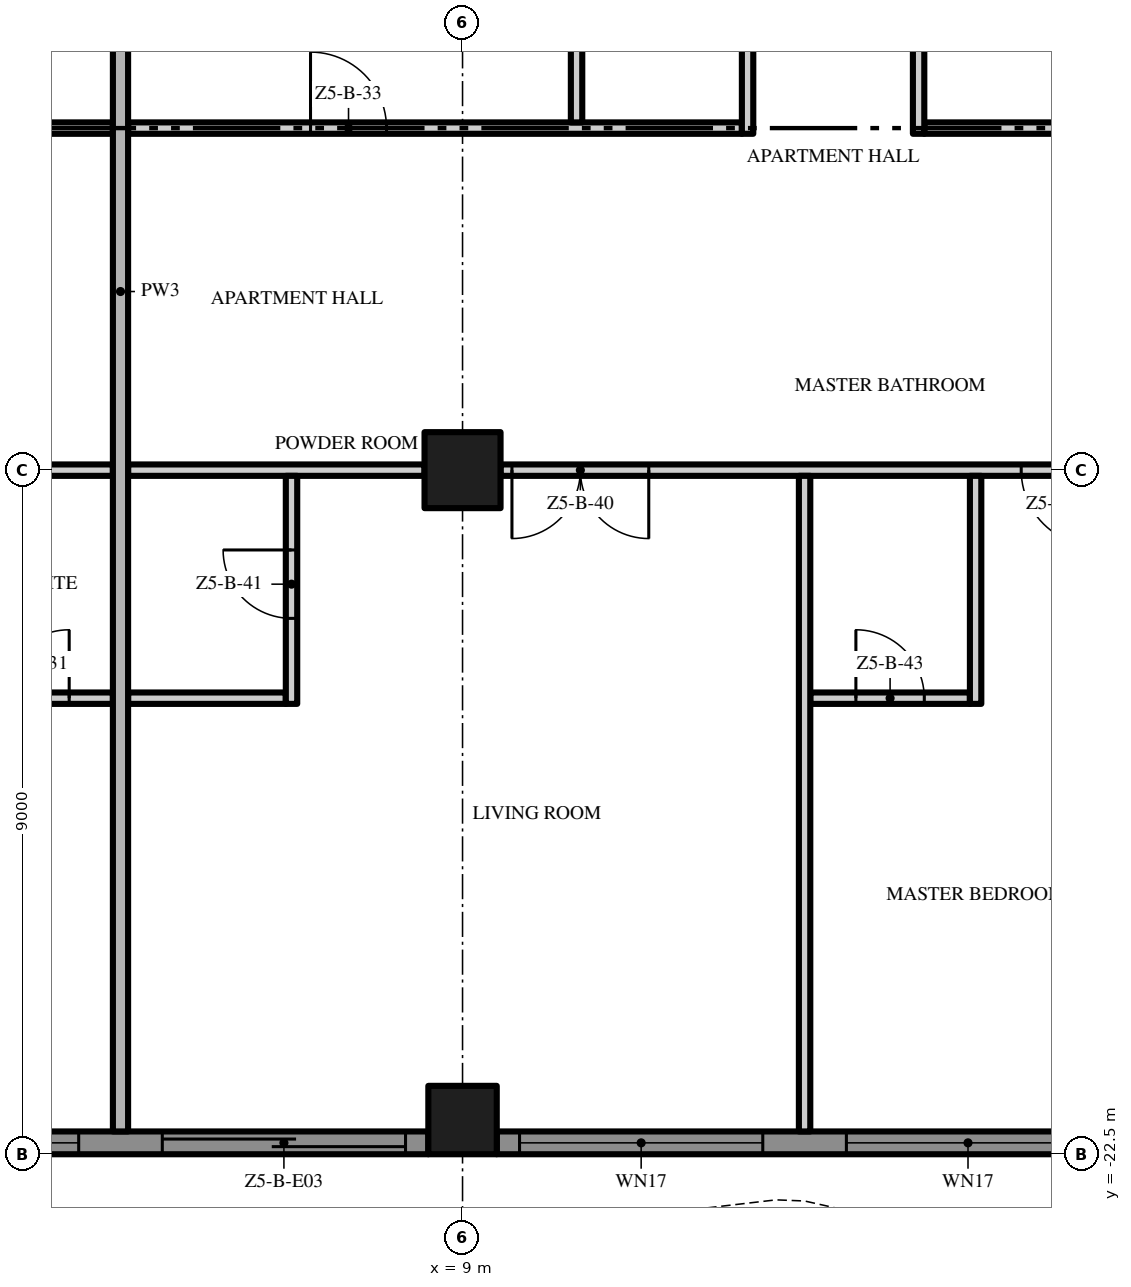
"""IFC4 building model, lengths in metres.
Left out: names, types, materials, properties, quantities, classifications, styles, units other than length and angle.
Written with IfcOpenShell. Run it as: python <this file> out.ifc"""

import sys

from ifc_helpers import new_model, si_unit, direction, frame, frame_2d, origin, origin_2d, place, context, subcontext, project, spatial, polyline, rectangle, outline, extrude, element, fill, save


model = new_model("IFC4")
c1 = context("Model", 3, precision=1e-05, world=origin(), true_north=direction((0.0, 1.0)))
c2 = subcontext(c1, "Body", "Model", "MODEL_VIEW")
j1 = project(units=[si_unit("LENGTHUNIT", "METRE"), si_unit("PLANEANGLEUNIT", "RADIAN")], contexts=[c1])
p1 = place(None, origin())
s1 = spatial("IfcSite", under=j1, at=p1, CompositionType="ELEMENT")
p2 = place(p1, origin())
s2 = spatial("IfcBuilding", under=s1, at=p2, CompositionType="ELEMENT")
p3 = place(p2, frame((0.0, 0.0, 254.0)))
s3 = spatial("IfcBuildingStorey", under=s2, at=p3, CompositionType="ELEMENT", Elevation=254.0)
p4 = place(p3, frame((9.0, -13.5, 0.0), z_axis=(0.0, 0.0, 1.0), x_axis=(1.0, 0.0, 0.0)))
e1 = element("IfcColumn", 1, at=p4, inside=s3, PredefinedType="COLUMN", context=c2, shape_type="SweptSolid", body=[
    extrude(rectangle(XDim=1.0, YDim=1.0, at=origin_2d()), origin(), (0.0, 0.0, 1.0), 3.5),
])
p5 = place(p3, frame((9.0, -22.05, 0.0), z_axis=(0.0, 0.0, 1.0), x_axis=(1.0, 0.0, 0.0)))
e2 = element("IfcColumn", 2, at=p5, inside=s3, PredefinedType="COLUMN", context=c2, shape_type="SweptSolid", body=[
    extrude(rectangle(XDim=0.9, YDim=0.9, at=origin_2d()), origin(), (0.0, 0.0, 1.0), 3.5),
])
p6 = place(p3, frame((8.55, -22.35, 0.0), z_axis=(0.0, 0.0, 1.0), x_axis=(-1.0, 0.0, 0.0)))
e3 = element("IfcWall", 3, at=p6, inside=s3, PredefinedType="SOLIDWALL", context=c2, shape_type="SweptSolid", body=[
    extrude(rectangle(XDim=8.1, YDim=0.3, at=frame_2d((4.05, 0.0))), origin(), (0.0, 0.0, 1.0), 3.5),
])
p7 = place(p6, frame((4.6, 0.0, 0.45)))
e4 = element("IfcOpeningElement", 4, at=p7, cuts=e3, PredefinedType="OPENING", context=c2, shape_type="SweptSolid", body=[
    extrude(rectangle(XDim=3.2, YDim=2.65, at=frame_2d((1.6, 1.325))), frame((0.0, 0.16, 0.0), z_axis=(0.0, -1.0, 0.0), x_axis=(1.0, 0.0, 0.0)), (0.0, 0.0, 1.0), 0.32),
])
p8 = place(p6, frame((0.3, 0.0, 0.0)))
e5 = element("IfcOpeningElement", 5, at=p8, cuts=e3, PredefinedType="OPENING", context=c2, shape_type="SweptSolid", body=[
    extrude(rectangle(XDim=3.2, YDim=2.4, at=frame_2d((1.6, 1.2))), frame((0.0, 0.16, 0.0), z_axis=(0.0, -1.0, 0.0), x_axis=(1.0, 0.0, 0.0)), (0.0, 0.0, 1.0), 0.32),
])
p9 = place(p3, frame((17.55, -22.35, 0.0), z_axis=(0.0, 0.0, 1.0), x_axis=(-1.0, 0.0, 0.0)))
e6 = element("IfcWall", 6, at=p9, inside=s3, PredefinedType="SOLIDWALL", context=c2, shape_type="SweptSolid", body=[
    extrude(rectangle(XDim=8.1, YDim=0.3, at=frame_2d((4.05, 0.0))), origin(), (0.0, 0.0, 1.0), 3.5),
])
p10 = place(p9, frame((4.6, 0.0, 0.45)))
e7 = element("IfcOpeningElement", 7, at=p10, cuts=e6, PredefinedType="OPENING", context=c2, shape_type="SweptSolid", body=[
    extrude(rectangle(XDim=3.2, YDim=2.65, at=frame_2d((1.6, 1.325))), frame((0.0, 0.16, 0.0), z_axis=(0.0, -1.0, 0.0), x_axis=(1.0, 0.0, 0.0)), (0.0, 0.0, 1.0), 0.32),
])
p11 = place(p9, frame((0.3, 0.0, 0.45)))
e8 = element("IfcOpeningElement", 8, at=p11, cuts=e6, PredefinedType="OPENING", context=c2, shape_type="SweptSolid", body=[
    extrude(rectangle(XDim=3.2, YDim=2.65, at=frame_2d((1.6, 1.325))), frame((0.0, 0.16, 0.0), z_axis=(0.0, -1.0, 0.0), x_axis=(1.0, 0.0, 0.0)), (0.0, 0.0, 1.0), 0.32),
])
p12 = place(p3, origin())
e9 = element("IfcWall", 9, at=p12, inside=s3, PredefinedType="USERDEFINED", context=c2, shape_type="SweptSolid", body=[
    extrude(outline(polyline([(-22.5, -25.149), (-21.0, -24.488), (-19.5, -23.755), (-18.0, -23.231), (-16.875, -23.1), (-16.5, -23.115), (-15.0, -23.451), (-13.5, -24.112), (-12.0, -24.845), (-10.5, -25.369), (-9.375, -25.5), (-9.0, -25.485), (-7.5, -25.149), (-6.0, -24.488), (-4.5, -23.755), (-3.0, -23.231), (-1.875, -23.1), (-1.5, -23.115), (0.0, -23.451), (1.5, -24.112), (3.0, -24.845), (4.5, -25.369), (5.625, -25.5), (6.0, -25.485), (7.5, -25.149), (9.0, -24.488), (10.5, -23.755), (12.0, -23.231), (13.125, -23.1), (13.5, -23.115), (15.0, -23.451), (16.5, -24.112), (18.0, -24.845), (19.5, -25.369), (20.625, -25.5), (21.0, -25.485), (22.5, -25.149), (22.445, -24.905), (20.967, -25.236), (20.635, -25.249), (19.556, -25.124), (18.096, -24.614), (16.605, -23.885), (15.079, -23.213), (13.533, -22.866), (13.115, -22.849), (11.944, -22.986), (10.404, -23.524), (8.895, -24.261), (7.421, -24.91), (5.967, -25.236), (5.635, -25.249), (4.556, -25.124), (3.096, -24.614), (1.605, -23.885), (0.079, -23.213), (-1.467, -22.866), (-1.885, -22.849), (-3.056, -22.986), (-4.596, -23.524), (-6.105, -24.261), (-7.579, -24.91), (-9.033, -25.236), (-9.365, -25.249), (-10.444, -25.124), (-11.904, -24.614), (-13.395, -23.885), (-14.921, -23.213), (-16.467, -22.866), (-16.885, -22.849), (-18.056, -22.986), (-19.596, -23.524), (-21.105, -24.261), (-22.601, -24.92), (-22.5, -25.149)])), origin(), (0.0, 0.0, 1.0), 0.9),
])
p13 = place(p3, frame((2.325, -16.5, 0.0), z_axis=(0.0, 0.0, 1.0), x_axis=(1.0, 0.0, 0.0)))
e10 = element("IfcWall", 10, at=p13, inside=s3, PredefinedType="PARTITIONING", context=c2, shape_type="SweptSolid", body=[
    extrude(rectangle(XDim=2.075, YDim=0.15, at=frame_2d((1.038, 0.0))), origin(), (0.0, 0.0, 1.0), 3.5),
])
p14 = place(p13, frame((0.6, 0.0, 0.0)))
e11 = element("IfcOpeningElement", 11, at=p14, cuts=e10, PredefinedType="OPENING", context=c2, shape_type="SweptSolid", body=[
    extrude(rectangle(XDim=0.9, YDim=2.1, at=frame_2d((0.45, 1.05))), frame((0.0, 0.085, 0.0), z_axis=(0.0, -1.0, 0.0), x_axis=(1.0, 0.0, 0.0)), (0.0, 0.0, 1.0), 0.17),
])
p15 = place(p3, frame((4.6, -16.5, 0.0), z_axis=(0.0, 0.0, 1.0), x_axis=(1.0, 0.0, 0.0)))
e12 = element("IfcWall", 12, at=p15, inside=s3, PredefinedType="PARTITIONING", context=c2, shape_type="SweptSolid", body=[
    extrude(rectangle(XDim=2.075, YDim=0.15, at=frame_2d((1.038, 0.0))), origin(), (0.0, 0.0, 1.0), 3.5),
])
p16 = place(p3, frame((13.575, -16.5, 0.0), z_axis=(0.0, 0.0, 1.0), x_axis=(1.0, 0.0, 0.0)))
e13 = element("IfcWall", 13, at=p16, inside=s3, PredefinedType="PARTITIONING", context=c2, shape_type="SweptSolid", body=[
    extrude(rectangle(XDim=2.1, YDim=0.15, at=frame_2d((1.05, 0.0))), origin(), (0.0, 0.0, 1.0), 3.5),
])
p17 = place(p16, frame((0.6, 0.0, 0.0)))
e14 = element("IfcOpeningElement", 14, at=p17, cuts=e13, PredefinedType="OPENING", context=c2, shape_type="SweptSolid", body=[
    extrude(rectangle(XDim=0.9, YDim=2.1, at=frame_2d((0.45, 1.05))), frame((0.0, 0.085, 0.0), z_axis=(0.0, -1.0, 0.0), x_axis=(1.0, 0.0, 0.0)), (0.0, 0.0, 1.0), 0.17),
])
p18 = place(p3, frame((4.4, -13.5, 0.0), z_axis=(0.0, 0.0, 1.0), x_axis=(-1.0, 0.0, 0.0)))
e15 = element("IfcWall", 15, at=p18, inside=s3, PredefinedType="PARTITIONING", context=c2, shape_type="SweptSolid", body=[
    extrude(rectangle(XDim=3.9, YDim=0.15, at=frame_2d((1.95, 0.0))), origin(), (0.0, 0.0, 1.0), 3.5),
])
p19 = place(p18, frame((2.75, 0.0, 0.0)))
e16 = element("IfcOpeningElement", 16, at=p19, cuts=e15, PredefinedType="OPENING", context=c2, shape_type="SweptSolid", body=[
    extrude(rectangle(XDim=1.0, YDim=2.4, at=frame_2d((0.5, 1.2))), frame((0.0, 0.085, 0.0), z_axis=(0.0, -1.0, 0.0), x_axis=(1.0, 0.0, 0.0)), (0.0, 0.0, 1.0), 0.17),
])
p20 = place(p3, frame((4.6, -13.5, 0.0), z_axis=(0.0, 0.0, 1.0), x_axis=(1.0, 0.0, 0.0)))
e17 = element("IfcWall", 17, at=p20, inside=s3, PredefinedType="PARTITIONING", context=c2, shape_type="SweptSolid", body=[
    extrude(rectangle(XDim=3.9, YDim=0.15, at=frame_2d((1.95, 0.0))), origin(), (0.0, 0.0, 1.0), 3.5),
])
p21 = place(p3, frame((17.5, -13.5, 0.0), z_axis=(0.0, 0.0, 1.0), x_axis=(-1.0, 0.0, 0.0)))
e18 = element("IfcWall", 18, at=p21, inside=s3, PredefinedType="PARTITIONING", context=c2, shape_type="SweptSolid", body=[
    extrude(rectangle(XDim=8.0, YDim=0.15, at=frame_2d((4.0, 0.0))), origin(), (0.0, 0.0, 1.0), 3.5),
])
p22 = place(p21, frame((6.05, 0.0, 0.0)))
e19 = element("IfcOpeningElement", 19, at=p22, cuts=e18, PredefinedType="OPENING", context=c2, shape_type="SweptSolid", body=[
    extrude(rectangle(XDim=1.8, YDim=2.4, at=frame_2d((0.9, 1.2))), frame((0.0, 0.085, 0.0), z_axis=(0.0, -1.0, 0.0), x_axis=(1.0, 0.0, 0.0)), (0.0, 0.0, 1.0), 0.17),
])
p23 = place(p21, frame((0.15, 0.0, 0.0)))
e20 = element("IfcOpeningElement", 20, at=p23, cuts=e18, PredefinedType="OPENING", context=c2, shape_type="SweptSolid", body=[
    extrude(rectangle(XDim=1.0, YDim=2.4, at=frame_2d((0.5, 1.2))), frame((0.0, 0.085, 0.0), z_axis=(0.0, -1.0, 0.0), x_axis=(1.0, 0.0, 0.0)), (0.0, 0.0, 1.0), 0.17),
])
p24 = place(p3, frame((-9.225, -9.0, 0.0), z_axis=(0.0, 0.0, 1.0), x_axis=(1.0, 0.0, 0.0)))
e21 = element("IfcWall", 21, at=p24, inside=s3, PredefinedType="PARTITIONING", context=c2, shape_type="SweptSolid", body=[
    extrude(rectangle(XDim=13.625, YDim=0.15, at=frame_2d((6.812, 0.0))), origin(), (0.0, 0.0, 1.0), 3.5),
])
p25 = place(p24, frame((1.0, 0.0, 0.0)))
e22 = element("IfcOpeningElement", 22, at=p25, cuts=e21, PredefinedType="OPENING", context=c2, shape_type="SweptSolid", body=[
    extrude(rectangle(XDim=0.9, YDim=2.1, at=frame_2d((0.45, 1.05))), frame((0.0, 0.085, 0.0), z_axis=(0.0, -1.0, 0.0), x_axis=(1.0, 0.0, 0.0)), (0.0, 0.0, 1.0), 0.17),
])
p26 = place(p24, frame((5.125, 0.0, 0.0)))
e23 = element("IfcOpeningElement", 23, at=p26, cuts=e21, PredefinedType="OPENING", context=c2, shape_type="SweptSolid", body=[
    extrude(rectangle(XDim=0.9, YDim=2.1, at=frame_2d((0.45, 1.05))), frame((0.0, 0.085, 0.0), z_axis=(0.0, -1.0, 0.0), x_axis=(1.0, 0.0, 0.0)), (0.0, 0.0, 1.0), 0.17),
])
p27 = place(p3, frame((4.6, -9.0, 0.0), z_axis=(0.0, 0.0, 1.0), x_axis=(1.0, 0.0, 0.0)))
e24 = element("IfcWall", 24, at=p27, inside=s3, PredefinedType="PARTITIONING", context=c2, shape_type="SweptSolid", body=[
    extrude(rectangle(XDim=8.075, YDim=0.15, at=frame_2d((4.037, 0.0))), origin(), (0.0, 0.0, 1.0), 3.5),
])
p28 = place(p27, frame((2.4, 0.0, 0.0)))
e25 = element("IfcOpeningElement", 25, at=p28, cuts=e24, PredefinedType="OPENING", context=c2, shape_type="SweptSolid", body=[
    extrude(rectangle(XDim=1.0, YDim=2.4, at=frame_2d((0.5, 1.2))), frame((0.0, 0.085, 0.0), z_axis=(0.0, -1.0, 0.0), x_axis=(1.0, 0.0, 0.0)), (0.0, 0.0, 1.0), 0.17),
])
p29 = place(p3, frame((15.075, -9.0, 0.0), z_axis=(0.0, 0.0, 1.0), x_axis=(1.0, 0.0, 0.0)))
e26 = element("IfcWall", 26, at=p29, inside=s3, PredefinedType="PARTITIONING", context=c2, shape_type="SweptSolid", body=[
    extrude(rectangle(XDim=11.625, YDim=0.15, at=frame_2d((5.812, 0.0))), origin(), (0.0, 0.0, 1.0), 3.5),
])
p30 = place(p29, frame((10.675, 0.0, 0.0)))
e27 = element("IfcOpeningElement", 27, at=p30, cuts=e26, PredefinedType="OPENING", context=c2, shape_type="SweptSolid", body=[
    extrude(rectangle(XDim=0.8, YDim=2.0, at=frame_2d((0.4, 1.0))), frame((0.0, 0.085, 0.0), z_axis=(0.0, -1.0, 0.0), x_axis=(1.0, 0.0, 0.0)), (0.0, 0.0, 1.0), 0.17),
])
p31 = place(p3, frame((4.5, -22.2, 0.0), z_axis=(0.0, 0.0, 1.0), x_axis=(0.0, 1.0, 0.0)))
e28 = element("IfcWall", 28, at=p31, inside=s3, PredefinedType="PARTITIONING", context=c2, shape_type="SweptSolid", body=[
    extrude(rectangle(XDim=22.1, YDim=0.2, at=frame_2d((11.05, 0.0))), origin(), (0.0, 0.0, 1.0), 3.5),
])
p32 = place(p3, frame((6.75, -16.575, 0.0), z_axis=(0.0, 0.0, 1.0), x_axis=(0.0, 1.0, 0.0)))
e29 = element("IfcWall", 29, at=p32, inside=s3, PredefinedType="PARTITIONING", context=c2, shape_type="SweptSolid", body=[
    extrude(rectangle(XDim=3.0, YDim=0.15, at=frame_2d((1.5, 0.0))), origin(), (0.0, 0.0, 1.0), 3.5),
])
p33 = place(p32, frame((1.125, 0.0, 0.0)))
e30 = element("IfcOpeningElement", 30, at=p33, cuts=e29, PredefinedType="OPENING", context=c2, shape_type="SweptSolid", body=[
    extrude(rectangle(XDim=0.9, YDim=2.1, at=frame_2d((0.45, 1.05))), frame((0.0, 0.085, 0.0), z_axis=(0.0, -1.0, 0.0), x_axis=(1.0, 0.0, 0.0)), (0.0, 0.0, 1.0), 0.17),
])
p34 = place(p3, frame((10.5, -8.925, 0.0), z_axis=(0.0, 0.0, 1.0), x_axis=(0.0, 1.0, 0.0)))
e31 = element("IfcWall", 31, at=p34, inside=s3, PredefinedType="PARTITIONING", context=c2, shape_type="SweptSolid", body=[
    extrude(rectangle(XDim=4.35, YDim=0.15, at=frame_2d((2.175, 0.0))), origin(), (0.0, 0.0, 1.0), 3.5),
])
p35 = place(p3, frame((12.75, -9.075, 0.0), z_axis=(0.0, 0.0, 1.0), x_axis=(0.0, 1.0, 0.0)))
e32 = element("IfcWall", 32, at=p35, inside=s3, PredefinedType="PARTITIONING", context=c2, shape_type="SweptSolid", body=[
    extrude(rectangle(XDim=4.5, YDim=0.15, at=frame_2d((2.25, 0.0))), origin(), (0.0, 0.0, 1.0), 3.5),
])
p36 = place(p35, frame((1.875, 0.0, 0.0)))
e33 = element("IfcOpeningElement", 33, at=p36, cuts=e32, PredefinedType="OPENING", context=c2, shape_type="SweptSolid", body=[
    extrude(rectangle(XDim=0.9, YDim=2.1, at=frame_2d((0.45, 1.05))), frame((0.0, 0.085, 0.0), z_axis=(0.0, -1.0, 0.0), x_axis=(1.0, 0.0, 0.0)), (0.0, 0.0, 1.0), 0.17),
])
p37 = place(p3, frame((13.5, -22.2, 0.0), z_axis=(0.0, 0.0, 1.0), x_axis=(0.0, 1.0, 0.0)))
e34 = element("IfcWall", 34, at=p37, inside=s3, PredefinedType="PARTITIONING", context=c2, shape_type="SweptSolid", body=[
    extrude(rectangle(XDim=8.625, YDim=0.15, at=frame_2d((4.312, 0.0))), origin(), (0.0, 0.0, 1.0), 3.5),
])
p38 = place(p3, frame((15.0, -9.075, 0.0), z_axis=(0.0, 0.0, 1.0), x_axis=(0.0, 1.0, 0.0)))
e35 = element("IfcWall", 35, at=p38, inside=s3, PredefinedType="PARTITIONING", context=c2, shape_type="SweptSolid", body=[
    extrude(rectangle(XDim=4.65, YDim=0.15, at=frame_2d((2.325, 0.0))), origin(), (0.0, 0.0, 1.0), 3.5),
])
p39 = place(p3, frame((15.75, -16.575, 0.0), z_axis=(0.0, 0.0, 1.0), x_axis=(0.0, 1.0, 0.0)))
e36 = element("IfcWall", 36, at=p39, inside=s3, PredefinedType="PARTITIONING", context=c2, shape_type="SweptSolid", body=[
    extrude(rectangle(XDim=3.0, YDim=0.15, at=frame_2d((1.5, 0.0))), origin(), (0.0, 0.0, 1.0), 3.5),
])
p40 = place(p7, origin())
e37 = element("IfcWindow", 37, at=p40, inside=s3, PartitioningType="SINGLE_PANEL", PredefinedType="WINDOW", context=c2, shape_type="SweptSolid", body=[
    extrude(rectangle(XDim=3.2, YDim=2.65, at=frame_2d((1.6, 1.325))), frame((0.0, 0.03, 0.0), z_axis=(0.0, -1.0, 0.0), x_axis=(1.0, 0.0, 0.0)), (0.0, 0.0, 1.0), 0.06),
])
fill(e4, e37)
p41 = place(p8, origin())
e38 = element("IfcDoor", 38, at=p41, inside=s3, OperationType="SINGLE_SWING_LEFT", PredefinedType="DOOR", context=c2, shape_type="SweptSolid", body=[
    extrude(rectangle(XDim=3.2, YDim=2.4, at=frame_2d((1.6, 1.2))), frame((0.0, 0.025, 0.0), z_axis=(0.0, -1.0, 0.0), x_axis=(1.0, 0.0, 0.0)), (0.0, 0.0, 1.0), 0.05),
])
fill(e5, e38)
p42 = place(p10, origin())
e39 = element("IfcWindow", 39, at=p42, inside=s3, PartitioningType="SINGLE_PANEL", PredefinedType="WINDOW", context=c2, shape_type="SweptSolid", body=[
    extrude(rectangle(XDim=3.2, YDim=2.65, at=frame_2d((1.6, 1.325))), frame((0.0, 0.03, 0.0), z_axis=(0.0, -1.0, 0.0), x_axis=(1.0, 0.0, 0.0)), (0.0, 0.0, 1.0), 0.06),
])
fill(e7, e39)
p43 = place(p11, origin())
e40 = element("IfcWindow", 40, at=p43, inside=s3, PartitioningType="SINGLE_PANEL", PredefinedType="WINDOW", context=c2, shape_type="SweptSolid", body=[
    extrude(rectangle(XDim=3.2, YDim=2.65, at=frame_2d((1.6, 1.325))), frame((0.0, 0.03, 0.0), z_axis=(0.0, -1.0, 0.0), x_axis=(1.0, 0.0, 0.0)), (0.0, 0.0, 1.0), 0.06),
])
fill(e8, e40)
p44 = place(p14, origin())
e41 = element("IfcDoor", 41, at=p44, inside=s3, OperationType="SINGLE_SWING_RIGHT", PredefinedType="DOOR", context=c2, shape_type="SweptSolid", body=[
    extrude(rectangle(XDim=0.9, YDim=2.1, at=frame_2d((0.45, 1.05))), frame((0.0, 0.025, 0.0), z_axis=(0.0, -1.0, 0.0), x_axis=(1.0, 0.0, 0.0)), (0.0, 0.0, 1.0), 0.05),
])
fill(e11, e41)
p45 = place(p28, origin())
e42 = element("IfcDoor", 42, at=p45, inside=s3, OperationType="SINGLE_SWING_LEFT", PredefinedType="DOOR", context=c2, shape_type="SweptSolid", body=[
    extrude(rectangle(XDim=1.0, YDim=2.4, at=frame_2d((0.5, 1.2))), frame((0.0, 0.025, 0.0), z_axis=(0.0, -1.0, 0.0), x_axis=(1.0, 0.0, 0.0)), (0.0, 0.0, 1.0), 0.05),
])
fill(e25, e42)
p46 = place(p22, origin())
e43 = element("IfcDoor", 43, at=p46, inside=s3, OperationType="DOUBLE_DOOR_SINGLE_SWING", PredefinedType="DOOR", context=c2, shape_type="SweptSolid", body=[
    extrude(rectangle(XDim=1.8, YDim=2.4, at=frame_2d((0.9, 1.2))), frame((0.0, 0.025, 0.0), z_axis=(0.0, -1.0, 0.0), x_axis=(1.0, 0.0, 0.0)), (0.0, 0.0, 1.0), 0.05),
])
fill(e19, e43)
p47 = place(p33, origin())
e44 = element("IfcDoor", 44, at=p47, inside=s3, OperationType="SINGLE_SWING_RIGHT", PredefinedType="DOOR", context=c2, shape_type="SweptSolid", body=[
    extrude(rectangle(XDim=0.9, YDim=2.1, at=frame_2d((0.45, 1.05))), frame((0.0, 0.025, 0.0), z_axis=(0.0, -1.0, 0.0), x_axis=(1.0, 0.0, 0.0)), (0.0, 0.0, 1.0), 0.05),
])
fill(e30, e44)
p48 = place(p23, origin())
e45 = element("IfcDoor", 45, at=p48, inside=s3, OperationType="SINGLE_SWING_LEFT", PredefinedType="DOOR", context=c2, shape_type="SweptSolid", body=[
    extrude(rectangle(XDim=1.0, YDim=2.4, at=frame_2d((0.5, 1.2))), frame((0.0, 0.025, 0.0), z_axis=(0.0, -1.0, 0.0), x_axis=(1.0, 0.0, 0.0)), (0.0, 0.0, 1.0), 0.05),
])
fill(e20, e45)
p49 = place(p17, origin())
e46 = element("IfcDoor", 46, at=p49, inside=s3, OperationType="SINGLE_SWING_LEFT", PredefinedType="DOOR", context=c2, shape_type="SweptSolid", body=[
    extrude(rectangle(XDim=0.9, YDim=2.1, at=frame_2d((0.45, 1.05))), frame((0.0, 0.025, 0.0), z_axis=(0.0, -1.0, 0.0), x_axis=(1.0, 0.0, 0.0)), (0.0, 0.0, 1.0), 0.05),
])
fill(e14, e46)
save(model, sys.argv[1])
